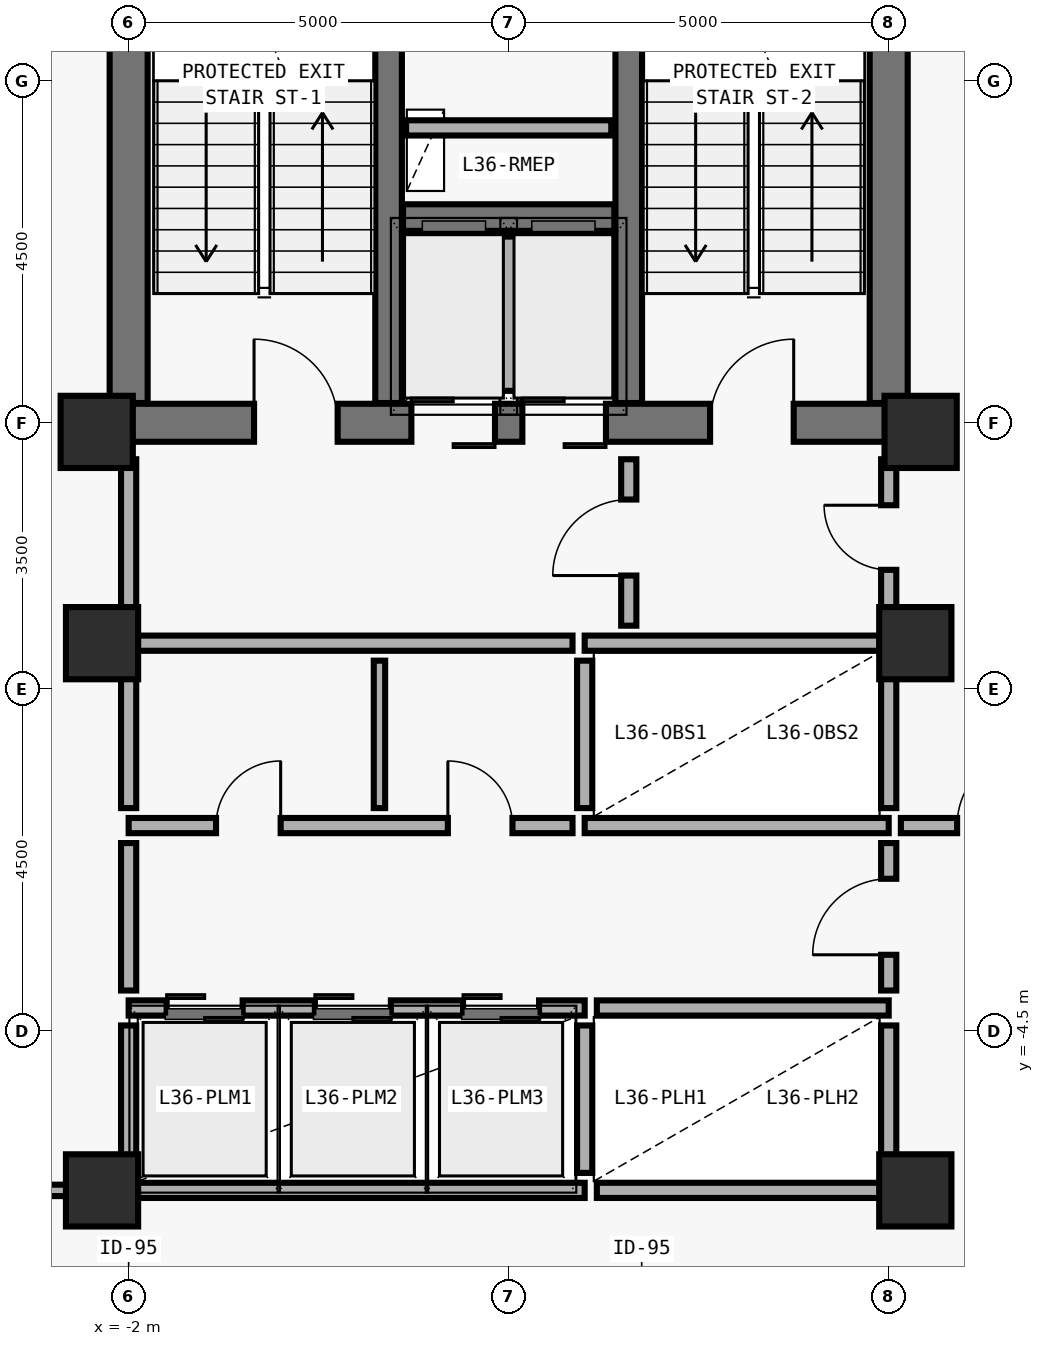
"""IFC4 building model, lengths in metres.
Left out: names, types, materials, properties, quantities, classifications, styles, units other than length and angle.
Written with IfcOpenShell. Run it as: python <this file> out.ifc"""

import sys

from ifc_helpers import new_model, si_unit, direction, frame, frame_2d, origin, origin_2d, place, context, subcontext, project, spatial, rectangle, extrude, element, fill, save


model = new_model("IFC4")
c1 = context("Model", 3, precision=1e-05, world=origin(), true_north=direction((0.0, 1.0)))
c2 = subcontext(c1, "Body", "Model", "MODEL_VIEW")
j1 = project(units=[si_unit("LENGTHUNIT", "METRE"), si_unit("PLANEANGLEUNIT", "RADIAN")], contexts=[c1])
p1 = place(None, origin())
s1 = spatial("IfcSite", under=j1, at=p1, CompositionType="ELEMENT")
p2 = place(p1, origin())
s2 = spatial("IfcBuilding", under=s1, at=p2, CompositionType="ELEMENT")
p3 = place(p2, frame((0.0, 0.0, 146.1)))
s3 = spatial("IfcBuildingStorey", under=s2, at=p3, CompositionType="ELEMENT", Elevation=146.1)
p4 = place(p3, frame((-2.0, 3.5, 0.0), z_axis=(0.0, 0.0, 1.0), x_axis=(1.0, 0.0, 0.0)))
e1 = element("IfcWall", 1, at=p4, inside=s3, PredefinedType="SHEAR", context=c2, shape_type="SweptSolid", body=[
    extrude(rectangle(XDim=10.0, YDim=0.5, at=frame_2d((5.0, 0.0))), origin(), (0.0, 0.0, 1.0), 3.892),
])
p5 = place(p4, frame((1.65, 0.0, 0.0)))
e2 = element("IfcOpeningElement", 2, at=p5, cuts=e1, PredefinedType="OPENING", context=c2, shape_type="SweptSolid", body=[
    extrude(rectangle(XDim=1.1, YDim=2.15, at=frame_2d((0.55, 1.075))), frame((0.0, 0.26, 0.0), z_axis=(0.0, -1.0, 0.0), x_axis=(1.0, 0.0, 0.0)), (0.0, 0.0, 1.0), 0.52),
])
p6 = place(p4, frame((7.65, 0.0, 0.0)))
e3 = element("IfcOpeningElement", 3, at=p6, cuts=e1, PredefinedType="OPENING", context=c2, shape_type="SweptSolid", body=[
    extrude(rectangle(XDim=1.1, YDim=2.15, at=frame_2d((0.55, 1.075))), frame((0.0, 0.26, 0.0), z_axis=(0.0, -1.0, 0.0), x_axis=(1.0, 0.0, 0.0)), (0.0, 0.0, 1.0), 0.52),
])
p7 = place(p4, frame((3.72, 0.0, 0.0)))
e4 = element("IfcOpeningElement", 4, at=p7, cuts=e1, PredefinedType="OPENING", context=c2, shape_type="SweptSolid", body=[
    extrude(rectangle(XDim=1.1, YDim=2.2, at=frame_2d((0.55, 1.1))), frame((0.0, 0.26, 0.0), z_axis=(0.0, -1.0, 0.0), x_axis=(1.0, 0.0, 0.0)), (0.0, 0.0, 1.0), 0.52),
])
p8 = place(p4, frame((5.18, 0.0, 0.0)))
e5 = element("IfcOpeningElement", 5, at=p8, cuts=e1, PredefinedType="OPENING", context=c2, shape_type="SweptSolid", body=[
    extrude(rectangle(XDim=1.1, YDim=2.2, at=frame_2d((0.55, 1.1))), frame((0.0, 0.26, 0.0), z_axis=(0.0, -1.0, 0.0), x_axis=(1.0, 0.0, 0.0)), (0.0, 0.0, 1.0), 0.52),
])
for number, where, z_axis, x_axis in (
    (6, (-2.0, 3.76, 0.0), (0.0, 0.0, 1.0), (0.0, 1.0, 0.0)),
    (7, (8.0, 3.76, 0.0), (0.0, 0.0, 1.0), (0.0, 1.0, 0.0)),
):
    element("IfcWall", number, at=place(p3, frame(where, z_axis=z_axis, x_axis=x_axis)), inside=s3, PredefinedType="SHEAR", context=c2, shape_type="SweptSolid", body=[
        extrude(rectangle(XDim=8.48, YDim=0.5, at=frame_2d((4.24, 0.0))), origin(), (0.0, 0.0, 1.0), 3.892),
    ])
for number, where, z_axis, x_axis in (
    (8, (1.42, 3.76, 0.0), (0.0, 0.0, 1.0), (0.0, 1.0, 0.0)),
    (9, (4.58, 3.76, 0.0), (0.0, 0.0, 1.0), (0.0, 1.0, 0.0)),
):
    element("IfcWall", number, at=place(p3, frame(where, z_axis=z_axis, x_axis=x_axis)), inside=s3, PredefinedType="SHEAR", context=c2, shape_type="SweptSolid", body=[
        extrude(rectangle(XDim=8.48, YDim=0.35, at=frame_2d((4.24, 0.0))), origin(), (0.0, 0.0, 1.0), 3.892),
    ])
p9 = place(p3, frame((1.61, 6.2, 0.0), z_axis=(0.0, 0.0, 1.0), x_axis=(1.0, 0.0, 0.0)))
e10 = element("IfcWall", 10, at=p9, inside=s3, PredefinedType="SHEAR", context=c2, shape_type="SweptSolid", body=[
    extrude(rectangle(XDim=2.78, YDim=0.35, at=frame_2d((1.39, 0.0))), origin(), (0.0, 0.0, 1.0), 3.892),
])
for number, where, z_axis, x_axis in (
    (11, (-2.42, 3.38, 0.0), (0.0, 0.0, 1.0), (1.0, 0.0, 0.0)),
    (12, (8.42, 3.38, 0.0), (0.0, 0.0, 1.0), (1.0, 0.0, 0.0)),
    (13, (-2.35, 0.6, 0.0), (0.0, 0.0, 1.0), (1.0, 0.0, 0.0)),
    (14, (8.35, 0.6, 0.0), (0.0, 0.0, 1.0), (1.0, 0.0, 0.0)),
    (15, (-2.35, -6.6, 0.0), (0.0, 0.0, 1.0), (1.0, 0.0, 0.0)),
    (16, (8.35, -6.6, 0.0), (0.0, 0.0, 1.0), (1.0, 0.0, 0.0)),
):
    element("IfcColumn", number, at=place(p3, frame(where, z_axis=z_axis, x_axis=x_axis)), inside=s3, PredefinedType="COLUMN", context=c2, shape_type="SweptSolid", body=[
        extrude(rectangle(XDim=0.95, YDim=0.95, at=origin_2d()), origin(), (0.0, 0.0, 1.0), 3.875),
    ])
p10 = place(p3, frame((3.0, 3.92, 0.0), z_axis=(0.0, 0.0, 1.0), x_axis=(0.0, 1.0, 0.0)))
e17 = element("IfcWall", 17, at=p10, inside=s3, PredefinedType="SOLIDWALL", context=c2, shape_type="SweptSolid", body=[
    extrude(rectangle(XDim=2.03, YDim=0.2, at=frame_2d((1.015, 0.0))), origin(), (0.0, 0.0, 1.0), 3.64),
])
p11 = place(p3, frame((1.65, 7.38, 0.0), z_axis=(0.0, 0.0, 1.0), x_axis=(1.0, 0.0, 0.0)))
e18 = element("IfcWall", 18, at=p11, inside=s3, PredefinedType="SOLIDWALL", context=c2, shape_type="SweptSolid", body=[
    extrude(rectangle(XDim=2.7, YDim=0.2, at=frame_2d((1.35, 0.0))), origin(), (0.0, 0.0, 1.0), 3.64),
])
p12 = place(p3, frame((4.0, 0.6, 0.0), z_axis=(0.0, 0.0, 1.0), x_axis=(1.0, 0.0, 0.0)))
e19 = element("IfcWall", 19, at=p12, inside=s3, PredefinedType="SOLIDWALL", context=c2, shape_type="SweptSolid", body=[
    extrude(rectangle(XDim=3.88, YDim=0.2, at=frame_2d((1.94, 0.0))), origin(), (0.0, 0.0, 1.0), 3.222),
])
p13 = place(p3, frame((4.0, -1.8, 0.0), z_axis=(0.0, 0.0, 1.0), x_axis=(1.0, 0.0, 0.0)))
e20 = element("IfcWall", 20, at=p13, inside=s3, PredefinedType="SOLIDWALL", context=c2, shape_type="SweptSolid", body=[
    extrude(rectangle(XDim=4.0, YDim=0.2, at=frame_2d((2.0, 0.0))), origin(), (0.0, 0.0, 1.0), 3.64),
])
p14 = place(p3, frame((4.0, -1.57, 0.0), z_axis=(0.0, 0.0, 1.0), x_axis=(0.0, 1.0, 0.0)))
e21 = element("IfcWall", 21, at=p14, inside=s3, PredefinedType="SOLIDWALL", context=c2, shape_type="SweptSolid", body=[
    extrude(rectangle(XDim=1.94, YDim=0.2, at=frame_2d((0.97, 0.0))), origin(), (0.0, 0.0, 1.0), 3.64),
])
p15 = place(p3, frame((8.0, -1.57, 0.0), z_axis=(0.0, 0.0, 1.0), x_axis=(0.0, 1.0, 0.0)))
e22 = element("IfcWall", 22, at=p15, inside=s3, PredefinedType="SOLIDWALL", context=c2, shape_type="SweptSolid", body=[
    extrude(rectangle(XDim=2.05, YDim=0.2, at=frame_2d((1.025, 0.0))), origin(), (0.0, 0.0, 1.0), 3.072),
])
p16 = place(p3, frame((-2.0, -4.2, 0.0), z_axis=(0.0, 0.0, 1.0), x_axis=(1.0, 0.0, 0.0)))
e23 = element("IfcWall", 23, at=p16, inside=s3, PredefinedType="SOLIDWALL", context=c2, shape_type="SweptSolid", body=[
    extrude(rectangle(XDim=6.0, YDim=0.2, at=frame_2d((3.0, 0.0))), origin(), (0.0, 0.0, 1.0), 3.64),
])
p17 = place(p16, frame((0.5, 0.0, 0.0)))
e24 = element("IfcOpeningElement", 24, at=p17, cuts=e23, PredefinedType="OPENING", context=c2, shape_type="SweptSolid", body=[
    extrude(rectangle(XDim=1.0, YDim=2.2, at=frame_2d((0.5, 1.1))), frame((0.0, 0.11, 0.0), z_axis=(0.0, -1.0, 0.0), x_axis=(1.0, 0.0, 0.0)), (0.0, 0.0, 1.0), 0.22),
])
p18 = place(p16, frame((2.45, 0.0, 0.0)))
e25 = element("IfcOpeningElement", 25, at=p18, cuts=e23, PredefinedType="OPENING", context=c2, shape_type="SweptSolid", body=[
    extrude(rectangle(XDim=1.0, YDim=2.2, at=frame_2d((0.5, 1.1))), frame((0.0, 0.11, 0.0), z_axis=(0.0, -1.0, 0.0), x_axis=(1.0, 0.0, 0.0)), (0.0, 0.0, 1.0), 0.22),
])
p19 = place(p16, frame((4.4, 0.0, 0.0)))
e26 = element("IfcOpeningElement", 26, at=p19, cuts=e23, PredefinedType="OPENING", context=c2, shape_type="SweptSolid", body=[
    extrude(rectangle(XDim=1.0, YDim=2.2, at=frame_2d((0.5, 1.1))), frame((0.0, 0.11, 0.0), z_axis=(0.0, -1.0, 0.0), x_axis=(1.0, 0.0, 0.0)), (0.0, 0.0, 1.0), 0.22),
])
p20 = place(p3, frame((-2.0, -6.6, 0.0), z_axis=(0.0, 0.0, 1.0), x_axis=(1.0, 0.0, 0.0)))
e27 = element("IfcWall", 27, at=p20, inside=s3, PredefinedType="SOLIDWALL", context=c2, shape_type="SweptSolid", body=[
    extrude(rectangle(XDim=6.0, YDim=0.2, at=frame_2d((3.0, 0.0))), origin(), (0.0, 0.0, 1.0), 3.222),
])
p21 = place(p3, frame((-2.0, -6.37, 0.0), z_axis=(0.0, 0.0, 1.0), x_axis=(0.0, 1.0, 0.0)))
e28 = element("IfcWall", 28, at=p21, inside=s3, PredefinedType="SOLIDWALL", context=c2, shape_type="SweptSolid", body=[
    extrude(rectangle(XDim=1.94, YDim=0.2, at=frame_2d((0.97, 0.0))), origin(), (0.0, 0.0, 1.0), 3.022),
])
p22 = place(p3, frame((4.16, -4.2, 0.0), z_axis=(0.0, 0.0, 1.0), x_axis=(1.0, 0.0, 0.0)))
e29 = element("IfcWall", 29, at=p22, inside=s3, PredefinedType="SOLIDWALL", context=c2, shape_type="SweptSolid", body=[
    extrude(rectangle(XDim=3.84, YDim=0.2, at=frame_2d((1.92, 0.0))), origin(), (0.0, 0.0, 1.0), 3.64),
])
p23 = place(p3, frame((4.16, -6.6, 0.0), z_axis=(0.0, 0.0, 1.0), x_axis=(1.0, 0.0, 0.0)))
e30 = element("IfcWall", 30, at=p23, inside=s3, PredefinedType="SOLIDWALL", context=c2, shape_type="SweptSolid", body=[
    extrude(rectangle(XDim=3.84, YDim=0.2, at=frame_2d((1.92, 0.0))), origin(), (0.0, 0.0, 1.0), 3.222),
])
p24 = place(p3, frame((4.0, -6.37, 0.0), z_axis=(0.0, 0.0, 1.0), x_axis=(0.0, 1.0, 0.0)))
e31 = element("IfcWall", 31, at=p24, inside=s3, PredefinedType="SOLIDWALL", context=c2, shape_type="SweptSolid", body=[
    extrude(rectangle(XDim=1.94, YDim=0.2, at=frame_2d((0.97, 0.0))), origin(), (0.0, 0.0, 1.0), 3.64),
])
p25 = place(p3, frame((8.0, -6.37, 0.0), z_axis=(0.0, 0.0, 1.0), x_axis=(0.0, 1.0, 0.0)))
e32 = element("IfcWall", 32, at=p25, inside=s3, PredefinedType="SOLIDWALL", context=c2, shape_type="SweptSolid", body=[
    extrude(rectangle(XDim=1.94, YDim=0.2, at=frame_2d((0.97, 0.0))), origin(), (0.0, 0.0, 1.0), 3.072),
])
p26 = place(p3, frame((4.58, 0.83, 0.0), z_axis=(0.0, 0.0, 1.0), x_axis=(0.0, 1.0, 0.0)))
e33 = element("IfcWall", 33, at=p26, inside=s3, PredefinedType="MOVABLE", context=c2, shape_type="SweptSolid", body=[
    extrude(rectangle(XDim=2.19, YDim=0.2, at=frame_2d((1.095, 0.0))), origin(), (0.0, 0.0, 1.0), 3.64),
])
p27 = place(p26, frame((0.66, 0.0, 0.0)))
e34 = element("IfcOpeningElement", 34, at=p27, cuts=e33, PredefinedType="OPENING", context=c2, shape_type="SweptSolid", body=[
    extrude(rectangle(XDim=1.0, YDim=2.1, at=frame_2d((0.5, 1.05))), frame((0.0, 0.11, 0.0), z_axis=(0.0, -1.0, 0.0), x_axis=(1.0, 0.0, 0.0)), (0.0, 0.0, 1.0), 0.22),
])
p28 = place(p3, frame((8.0, 0.72, 0.0), z_axis=(0.0, 0.0, 1.0), x_axis=(0.0, 1.0, 0.0)))
e35 = element("IfcWall", 35, at=p28, inside=s3, PredefinedType="MOVABLE", context=c2, shape_type="SweptSolid", body=[
    extrude(rectangle(XDim=2.3, YDim=0.2, at=frame_2d((1.15, 0.0))), origin(), (0.0, 0.0, 1.0), 2.872),
])
p29 = place(p28, frame((0.845, 0.0, 0.0)))
e36 = element("IfcOpeningElement", 36, at=p29, cuts=e35, PredefinedType="OPENING", context=c2, shape_type="SweptSolid", body=[
    extrude(rectangle(XDim=0.85, YDim=2.1, at=frame_2d((0.425, 1.05))), frame((0.0, 0.11, 0.0), z_axis=(0.0, -1.0, 0.0), x_axis=(1.0, 0.0, 0.0)), (0.0, 0.0, 1.0), 0.22),
])
p30 = place(p3, frame((8.0, -3.97, 0.0), z_axis=(0.0, 0.0, 1.0), x_axis=(0.0, 1.0, 0.0)))
e37 = element("IfcWall", 37, at=p30, inside=s3, PredefinedType="MOVABLE", context=c2, shape_type="SweptSolid", body=[
    extrude(rectangle(XDim=1.94, YDim=0.2, at=frame_2d((0.97, 0.0))), origin(), (0.0, 0.0, 1.0), 3.072),
])
p31 = place(p30, frame((0.47, 0.0, 0.0)))
e38 = element("IfcOpeningElement", 38, at=p31, cuts=e37, PredefinedType="OPENING", context=c2, shape_type="SweptSolid", body=[
    extrude(rectangle(XDim=1.0, YDim=2.1, at=frame_2d((0.5, 1.05))), frame((0.0, 0.11, 0.0), z_axis=(0.0, -1.0, 0.0), x_axis=(1.0, 0.0, 0.0)), (0.0, 0.0, 1.0), 0.22),
])
p32 = place(p3, frame((-2.0, -1.8, 0.0), z_axis=(0.0, 0.0, 1.0), x_axis=(1.0, 0.0, 0.0)))
e39 = element("IfcWall", 39, at=p32, inside=s3, PredefinedType="MOVABLE", context=c2, shape_type="SweptSolid", body=[
    extrude(rectangle(XDim=5.84, YDim=0.2, at=frame_2d((2.92, 0.0))), origin(), (0.0, 0.0, 1.0), 3.64),
])
p33 = place(p32, frame((1.15, 0.0, 0.0)))
e40 = element("IfcOpeningElement", 40, at=p33, cuts=e39, PredefinedType="OPENING", context=c2, shape_type="SweptSolid", body=[
    extrude(rectangle(XDim=0.85, YDim=2.1, at=frame_2d((0.425, 1.05))), frame((0.0, 0.11, 0.0), z_axis=(0.0, -1.0, 0.0), x_axis=(1.0, 0.0, 0.0)), (0.0, 0.0, 1.0), 0.22),
])
p34 = place(p32, frame((4.2, 0.0, 0.0)))
e41 = element("IfcOpeningElement", 41, at=p34, cuts=e39, PredefinedType="OPENING", context=c2, shape_type="SweptSolid", body=[
    extrude(rectangle(XDim=0.85, YDim=2.1, at=frame_2d((0.425, 1.05))), frame((0.0, 0.11, 0.0), z_axis=(0.0, -1.0, 0.0), x_axis=(1.0, 0.0, 0.0)), (0.0, 0.0, 1.0), 0.22),
])
p35 = place(p3, frame((8.16, -1.8, 0.0), z_axis=(0.0, 0.0, 1.0), x_axis=(1.0, 0.0, 0.0)))
e42 = element("IfcWall", 42, at=p35, inside=s3, PredefinedType="MOVABLE", context=c2, shape_type="SweptSolid", body=[
    extrude(rectangle(XDim=2.64, YDim=0.2, at=frame_2d((1.32, 0.0))), origin(), (0.0, 0.0, 1.0), 3.64),
])
p36 = place(p35, frame((0.74, 0.0, 0.0)))
e43 = element("IfcOpeningElement", 43, at=p36, cuts=e42, PredefinedType="OPENING", context=c2, shape_type="SweptSolid", body=[
    extrude(rectangle(XDim=1.0, YDim=2.1, at=frame_2d((0.5, 1.05))), frame((0.0, 0.11, 0.0), z_axis=(0.0, -1.0, 0.0), x_axis=(1.0, 0.0, 0.0)), (0.0, 0.0, 1.0), 0.22),
])
p37 = place(p3, frame((-2.16, -6.6, 0.0), z_axis=(0.0, 0.0, 1.0), x_axis=(-1.0, 0.0, 0.0)))
e44 = element("IfcWall", 44, at=p37, inside=s3, PredefinedType="PARTITIONING", context=c2, shape_type="SweptSolid", body=[
    extrude(rectangle(XDim=10.34, YDim=0.15, at=frame_2d((5.17, 0.0))), origin(), (0.0, 0.0, 1.0), 3.072),
])
p38 = place(p37, frame((4.615, 0.0, 0.0)))
e45 = element("IfcOpeningElement", 45, at=p38, cuts=e44, PredefinedType="OPENING", context=c2, shape_type="SweptSolid", body=[
    extrude(rectangle(XDim=0.95, YDim=2.1, at=frame_2d((0.475, 1.05))), frame((0.0, 0.085, 0.0), z_axis=(0.0, -1.0, 0.0), x_axis=(1.0, 0.0, 0.0)), (0.0, 0.0, 1.0), 0.17),
])
p39 = place(p3, frame((-1.88, 0.6, 0.0), z_axis=(0.0, 0.0, 1.0), x_axis=(1.0, 0.0, 0.0)))
e46 = element("IfcWall", 46, at=p39, inside=s3, PredefinedType="MOVABLE", context=c2, shape_type="SweptSolid", body=[
    extrude(rectangle(XDim=5.72, YDim=0.2, at=frame_2d((2.86, 0.0))), origin(), (0.0, 0.0, 1.0), 3.222),
])
p40 = place(p3, frame((-2.0, 0.72, 0.0), z_axis=(0.0, 0.0, 1.0), x_axis=(0.0, 1.0, 0.0)))
e47 = element("IfcWall", 47, at=p40, inside=s3, PredefinedType="MOVABLE", context=c2, shape_type="SweptSolid", body=[
    extrude(rectangle(XDim=2.3, YDim=0.2, at=frame_2d((1.15, 0.0))), origin(), (0.0, 0.0, 1.0), 2.872),
])
p41 = place(p3, frame((-2.0, -3.97, 0.0), z_axis=(0.0, 0.0, 1.0), x_axis=(0.0, 1.0, 0.0)))
e48 = element("IfcWall", 48, at=p41, inside=s3, PredefinedType="MOVABLE", context=c2, shape_type="SweptSolid", body=[
    extrude(rectangle(XDim=1.94, YDim=0.2, at=frame_2d((0.97, 0.0))), origin(), (0.0, 0.0, 1.0), 3.022),
])
p42 = place(p3, frame((1.3, -1.57, 0.0), z_axis=(0.0, 0.0, 1.0), x_axis=(0.0, 1.0, 0.0)))
e49 = element("IfcWall", 49, at=p42, inside=s3, PredefinedType="PARTITIONING", context=c2, shape_type="SweptSolid", body=[
    extrude(rectangle(XDim=1.94, YDim=0.15, at=frame_2d((0.97, 0.0))), origin(), (0.0, 0.0, 1.0), 3.64),
])
p43 = place(p3, frame((-2.0, -1.57, 0.0), z_axis=(0.0, 0.0, 1.0), x_axis=(0.0, 1.0, 0.0)))
e50 = element("IfcWall", 50, at=p43, inside=s3, PredefinedType="MOVABLE", context=c2, shape_type="SweptSolid", body=[
    extrude(rectangle(XDim=2.05, YDim=0.2, at=frame_2d((1.025, 0.0))), origin(), (0.0, 0.0, 1.0), 3.022),
])
p44 = place(p5, origin())
e51 = element("IfcDoor", 51, at=p44, inside=s3, OperationType="SINGLE_SWING_LEFT", PredefinedType="DOOR", context=c2, shape_type="SweptSolid", body=[
    extrude(rectangle(XDim=1.1, YDim=2.15, at=frame_2d((0.55, 1.075))), frame((0.0, 0.025, 0.0), z_axis=(0.0, -1.0, 0.0), x_axis=(1.0, 0.0, 0.0)), (0.0, 0.0, 1.0), 0.05),
])
fill(e2, e51)
p45 = place(p6, origin())
e52 = element("IfcDoor", 52, at=p45, inside=s3, OperationType="SINGLE_SWING_RIGHT", PredefinedType="DOOR", context=c2, shape_type="SweptSolid", body=[
    extrude(rectangle(XDim=1.1, YDim=2.15, at=frame_2d((0.55, 1.075))), frame((0.0, 0.025, 0.0), z_axis=(0.0, -1.0, 0.0), x_axis=(1.0, 0.0, 0.0)), (0.0, 0.0, 1.0), 0.05),
])
fill(e3, e52)
p46 = place(p7, origin())
e53 = element("IfcDoor", 53, at=p46, inside=s3, OperationType="DOUBLE_DOOR_SLIDING", PredefinedType="DOOR", context=c2, shape_type="SweptSolid", body=[
    extrude(rectangle(XDim=1.1, YDim=2.2, at=frame_2d((0.55, 1.1))), frame((0.0, 0.025, 0.0), z_axis=(0.0, -1.0, 0.0), x_axis=(1.0, 0.0, 0.0)), (0.0, 0.0, 1.0), 0.05),
])
fill(e4, e53)
p47 = place(p8, origin())
e54 = element("IfcDoor", 54, at=p47, inside=s3, OperationType="DOUBLE_DOOR_SLIDING", PredefinedType="DOOR", context=c2, shape_type="SweptSolid", body=[
    extrude(rectangle(XDim=1.1, YDim=2.2, at=frame_2d((0.55, 1.1))), frame((0.0, 0.025, 0.0), z_axis=(0.0, -1.0, 0.0), x_axis=(1.0, 0.0, 0.0)), (0.0, 0.0, 1.0), 0.05),
])
fill(e5, e54)
p48 = place(p27, origin())
e55 = element("IfcDoor", 55, at=p48, inside=s3, OperationType="SINGLE_SWING_LEFT", PredefinedType="DOOR", context=c2, shape_type="SweptSolid", body=[
    extrude(rectangle(XDim=1.0, YDim=2.1, at=frame_2d((0.5, 1.05))), frame((0.0, 0.025, 0.0), z_axis=(0.0, -1.0, 0.0), x_axis=(1.0, 0.0, 0.0)), (0.0, 0.0, 1.0), 0.05),
])
fill(e34, e55)
p49 = place(p29, origin())
e56 = element("IfcDoor", 56, at=p49, inside=s3, OperationType="SINGLE_SWING_RIGHT", PredefinedType="DOOR", context=c2, shape_type="SweptSolid", body=[
    extrude(rectangle(XDim=0.85, YDim=2.1, at=frame_2d((0.425, 1.05))), frame((0.0, 0.025, 0.0), z_axis=(0.0, -1.0, 0.0), x_axis=(1.0, 0.0, 0.0)), (0.0, 0.0, 1.0), 0.05),
])
fill(e36, e56)
p50 = place(p31, origin())
e57 = element("IfcDoor", 57, at=p50, inside=s3, OperationType="SINGLE_SWING_LEFT", PredefinedType="DOOR", context=c2, shape_type="SweptSolid", body=[
    extrude(rectangle(XDim=1.0, YDim=2.1, at=frame_2d((0.5, 1.05))), frame((0.0, 0.025, 0.0), z_axis=(0.0, -1.0, 0.0), x_axis=(1.0, 0.0, 0.0)), (0.0, 0.0, 1.0), 0.05),
])
fill(e38, e57)
p51 = place(p33, origin())
e58 = element("IfcDoor", 58, at=p51, inside=s3, OperationType="SINGLE_SWING_RIGHT", PredefinedType="DOOR", context=c2, shape_type="SweptSolid", body=[
    extrude(rectangle(XDim=0.85, YDim=2.1, at=frame_2d((0.425, 1.05))), frame((0.0, 0.025, 0.0), z_axis=(0.0, -1.0, 0.0), x_axis=(1.0, 0.0, 0.0)), (0.0, 0.0, 1.0), 0.05),
])
fill(e40, e58)
p52 = place(p34, origin())
e59 = element("IfcDoor", 59, at=p52, inside=s3, OperationType="SINGLE_SWING_LEFT", PredefinedType="DOOR", context=c2, shape_type="SweptSolid", body=[
    extrude(rectangle(XDim=0.85, YDim=2.1, at=frame_2d((0.425, 1.05))), frame((0.0, 0.025, 0.0), z_axis=(0.0, -1.0, 0.0), x_axis=(1.0, 0.0, 0.0)), (0.0, 0.0, 1.0), 0.05),
])
fill(e41, e59)
p53 = place(p36, origin())
e60 = element("IfcDoor", 60, at=p53, inside=s3, OperationType="SINGLE_SWING_RIGHT", PredefinedType="DOOR", context=c2, shape_type="SweptSolid", body=[
    extrude(rectangle(XDim=1.0, YDim=2.1, at=frame_2d((0.5, 1.05))), frame((0.0, 0.025, 0.0), z_axis=(0.0, -1.0, 0.0), x_axis=(1.0, 0.0, 0.0)), (0.0, 0.0, 1.0), 0.05),
])
fill(e43, e60)
p54 = place(p17, origin())
e61 = element("IfcDoor", 61, at=p54, inside=s3, OperationType="DOUBLE_DOOR_SLIDING", PredefinedType="DOOR", context=c2, shape_type="SweptSolid", body=[
    extrude(rectangle(XDim=1.0, YDim=2.2, at=frame_2d((0.5, 1.1))), frame((0.0, 0.025, 0.0), z_axis=(0.0, -1.0, 0.0), x_axis=(1.0, 0.0, 0.0)), (0.0, 0.0, 1.0), 0.05),
])
fill(e24, e61)
p55 = place(p18, origin())
e62 = element("IfcDoor", 62, at=p55, inside=s3, OperationType="DOUBLE_DOOR_SLIDING", PredefinedType="DOOR", context=c2, shape_type="SweptSolid", body=[
    extrude(rectangle(XDim=1.0, YDim=2.2, at=frame_2d((0.5, 1.1))), frame((0.0, 0.025, 0.0), z_axis=(0.0, -1.0, 0.0), x_axis=(1.0, 0.0, 0.0)), (0.0, 0.0, 1.0), 0.05),
])
fill(e25, e62)
p56 = place(p19, origin())
e63 = element("IfcDoor", 63, at=p56, inside=s3, OperationType="DOUBLE_DOOR_SLIDING", PredefinedType="DOOR", context=c2, shape_type="SweptSolid", body=[
    extrude(rectangle(XDim=1.0, YDim=2.2, at=frame_2d((0.5, 1.1))), frame((0.0, 0.025, 0.0), z_axis=(0.0, -1.0, 0.0), x_axis=(1.0, 0.0, 0.0)), (0.0, 0.0, 1.0), 0.05),
])
fill(e26, e63)
save(model, sys.argv[1])
